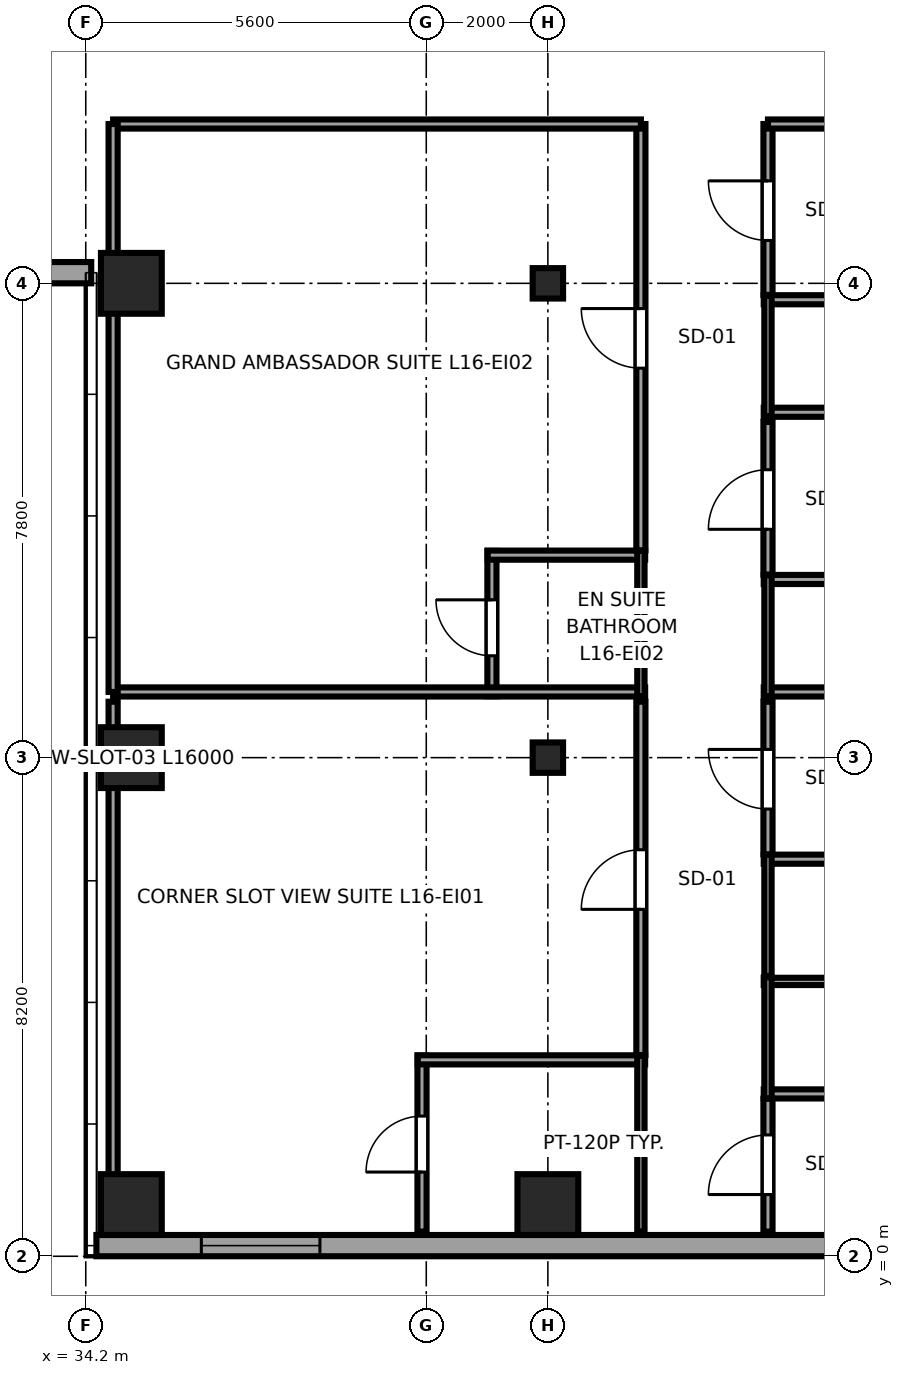
"""IFC4 building model, lengths in metres.
Left out: names, types, materials, properties, quantities, classifications, styles, units other than length and angle.
Written with IfcOpenShell. Run it as: python <this file> out.ifc"""

import sys

from ifc_helpers import new_model, si_unit, direction, frame, frame_2d, origin, origin_2d, place, context, subcontext, project, spatial, rectangle, i_section, extrude, source, transform, mapped, element, fill, save


model = new_model("IFC4")
c1 = context("Model", 3, precision=1e-05, world=origin(), true_north=direction((0.0, 1.0)))
c2 = subcontext(c1, "Body", "Model", "MODEL_VIEW")
j1 = project(units=[si_unit("LENGTHUNIT", "METRE"), si_unit("PLANEANGLEUNIT", "RADIAN")], contexts=[c1])
p1 = place(None, origin())
s1 = spatial("IfcSite", under=j1, at=p1, CompositionType="ELEMENT")
p2 = place(p1, origin())
s2 = spatial("IfcBuilding", under=s1, at=p2, CompositionType="ELEMENT")
p3 = place(p2, frame((0.0, 0.0, 67.5)))
s3 = spatial("IfcBuildingStorey", under=s2, at=p3, CompositionType="ELEMENT", Elevation=67.5)
m1 = source(origin(), c2, "Body", "SweptSolid", [
    extrude(rectangle(XDim=1.0, YDim=1.0, at=origin_2d()), origin(), (0.0, 0.0, 1.0), 3.55),
])
for number, where, z_axis, x_axis in (
    (1, (34.95, 0.85, 0.0), (0.0, 0.0, 1.0), (1.0, 0.0, 0.0)),
    (2, (34.95, 8.2, 0.0), (0.0, 0.0, 1.0), (1.0, 0.0, 0.0)),
    (3, (34.95, 16.0, 0.0), (0.0, 0.0, 1.0), (1.0, 0.0, 0.0)),
    (4, (41.8, 0.85, 0.0), (0.0, 0.0, 1.0), (1.0, 0.0, 0.0)),
):
    element("IfcColumn", number, at=place(p3, frame(where, z_axis=z_axis, x_axis=x_axis)), inside=s3, PredefinedType="COLUMN", context=c2, shape_type="MappedRepresentation", body=[
        mapped(m1, transform((0.0, 0.0, 0.0), x_axis=(1.0, 0.0, 0.0), y_axis=(0.0, 1.0, 0.0), z_axis=(0.0, 0.0, 1.0), scale=1.0)),
    ])
m2 = source(origin(), c2, "Body", "SweptSolid", [
    extrude(i_section(OverallWidth=0.5, OverallDepth=0.5, WebThickness=0.028, FlangeThickness=0.045, at=origin_2d()), origin(), (0.0, 0.0, 1.0), 3.55),
])
for number, where, z_axis, x_axis in (
    (5, (41.8, 8.2, 0.0), (0.0, 0.0, 1.0), (1.0, 0.0, 0.0)),
    (6, (41.8, 16.0, 0.0), (0.0, 0.0, 1.0), (1.0, 0.0, 0.0)),
):
    element("IfcColumn", number, at=place(p3, frame(where, z_axis=z_axis, x_axis=x_axis)), inside=s3, PredefinedType="COLUMN", context=c2, shape_type="MappedRepresentation", body=[
        mapped(m2, transform((0.0, 0.0, 0.0), x_axis=(1.0, 0.0, 0.0), y_axis=(0.0, 1.0, 0.0), z_axis=(0.0, 0.0, 1.0), scale=1.0)),
    ])
p4 = place(p3, frame((22.71, 16.175, 0.0), z_axis=(0.0, 0.0, 1.0), x_axis=(1.0, 0.0, 0.0)))
e7 = element("IfcWall", 7, at=p4, inside=s3, PredefinedType="SOLIDWALL", context=c2, shape_type="SweptSolid", body=[
    extrude(rectangle(XDim=11.58, YDim=0.35, at=frame_2d((5.79, 0.0))), origin(), (0.0, 0.0, 1.0), 2.748),
])
p5 = place(p4, frame((2.22, 0.0, 0.68)))
e8 = element("IfcOpeningElement", 8, at=p5, cuts=e7, PredefinedType="OPENING", context=c2, shape_type="SweptSolid", body=[
    extrude(rectangle(XDim=1.95, YDim=1.82, at=frame_2d((0.975, 0.91))), frame((0.0, 0.185, 0.0), z_axis=(0.0, -1.0, 0.0), x_axis=(1.0, 0.0, 0.0)), (0.0, 0.0, 1.0), 0.37),
])
p6 = place(p4, frame((7.41, 0.0, 0.68)))
e9 = element("IfcOpeningElement", 9, at=p6, cuts=e7, PredefinedType="OPENING", context=c2, shape_type="SweptSolid", body=[
    extrude(rectangle(XDim=1.95, YDim=1.82, at=frame_2d((0.975, 0.91))), frame((0.0, 0.185, 0.0), z_axis=(0.0, -1.0, 0.0), x_axis=(1.0, 0.0, 0.0)), (0.0, 0.0, 1.0), 0.37),
])
p7 = place(p3, frame((34.375, 0.175, 0.0), z_axis=(0.0, 0.0, 1.0), x_axis=(1.0, 0.0, 0.0)))
e10 = element("IfcWall", 10, at=p7, inside=s3, PredefinedType="SOLIDWALL", context=c2, shape_type="SweptSolid", body=[
    extrude(rectangle(XDim=18.008, YDim=0.35, at=frame_2d((9.004, 0.0))), origin(), (0.0, 0.0, 1.0), 3.37),
])
p8 = place(p7, frame((1.726, 0.0, 0.68)))
e11 = element("IfcOpeningElement", 11, at=p8, cuts=e10, PredefinedType="OPENING", context=c2, shape_type="SweptSolid", body=[
    extrude(rectangle(XDim=1.95, YDim=1.82, at=frame_2d((0.975, 0.91))), frame((0.0, 0.185, 0.0), z_axis=(0.0, -1.0, 0.0), x_axis=(1.0, 0.0, 0.0)), (0.0, 0.0, 1.0), 0.37),
])
p9 = place(p7, frame((12.825, 0.0, 0.62)))
e12 = element("IfcOpeningElement", 12, at=p9, cuts=e10, PredefinedType="OPENING", context=c2, shape_type="SweptSolid", body=[
    extrude(rectangle(XDim=1.5, YDim=1.55, at=frame_2d((0.75, 0.775))), frame((0.0, 0.185, 0.0), z_axis=(0.0, -1.0, 0.0), x_axis=(1.0, 0.0, 0.0)), (0.0, 0.0, 1.0), 0.37),
])
p10 = place(p3, frame((39.73, 0.405, 0.0), z_axis=(0.0, 0.0, 1.0), x_axis=(0.0, 1.0, 0.0)))
e13 = element("IfcWall", 13, at=p10, inside=s3, PredefinedType="PARTITIONING", context=c2, shape_type="SweptSolid", body=[
    extrude(rectangle(XDim=2.895, YDim=0.15, at=frame_2d((1.448, 0.0))), origin(), (0.0, 0.0, 1.0), 3.37),
])
p11 = place(p10, frame((0.98, 0.0, 0.0)))
e14 = element("IfcOpeningElement", 14, at=p11, cuts=e13, PredefinedType="OPENING", context=c2, shape_type="SweptSolid", body=[
    extrude(rectangle(XDim=0.92, YDim=2.01, at=frame_2d((0.46, 1.005))), frame((0.0, 0.085, 0.0), z_axis=(0.0, -1.0, 0.0), x_axis=(1.0, 0.0, 0.0)), (0.0, 0.0, 1.0), 0.17),
])
p12 = place(p3, frame((39.66, 3.23, 0.0), z_axis=(0.0, 0.0, 1.0), x_axis=(1.0, 0.0, 0.0)))
e15 = element("IfcWall", 15, at=p12, inside=s3, PredefinedType="PARTITIONING", context=c2, shape_type="SweptSolid", body=[
    extrude(rectangle(XDim=3.74, YDim=0.15, at=frame_2d((1.87, 0.0))), origin(), (0.0, 0.0, 1.0), 3.37),
])
p13 = place(p3, frame((43.33, 0.405, 0.0), z_axis=(0.0, 0.0, 1.0), x_axis=(0.0, 1.0, 0.0)))
e16 = element("IfcWall", 16, at=p13, inside=s3, PredefinedType="PLUMBINGWALL", context=c2, shape_type="SweptSolid", body=[
    extrude(rectangle(XDim=2.895, YDim=0.12, at=frame_2d((1.448, 0.0))), origin(), (0.0, 0.0, 1.0), 3.37),
])
p14 = place(p3, frame((40.88, 9.21, 0.0), z_axis=(0.0, 0.0, 1.0), x_axis=(0.0, 1.0, 0.0)))
e17 = element("IfcWall", 17, at=p14, inside=s3, PredefinedType="PARTITIONING", context=c2, shape_type="SweptSolid", body=[
    extrude(rectangle(XDim=2.39, YDim=0.15, at=frame_2d((1.195, 0.0))), origin(), (0.0, 0.0, 1.0), 3.37),
])
p15 = place(p14, frame((0.665, 0.0, 0.0)))
e18 = element("IfcOpeningElement", 18, at=p15, cuts=e17, PredefinedType="OPENING", context=c2, shape_type="SweptSolid", body=[
    extrude(rectangle(XDim=0.92, YDim=2.01, at=frame_2d((0.46, 1.005))), frame((0.0, 0.085, 0.0), z_axis=(0.0, -1.0, 0.0), x_axis=(1.0, 0.0, 0.0)), (0.0, 0.0, 1.0), 0.17),
])
p16 = place(p3, frame((34.65, 9.28, 0.0), z_axis=(0.0, 0.0, 1.0), x_axis=(1.0, 0.0, 0.0)))
e19 = element("IfcWall", 19, at=p16, inside=s3, PredefinedType="PARTITIONING", context=c2, shape_type="SweptSolid", body=[
    extrude(rectangle(XDim=8.75, YDim=0.15, at=frame_2d((4.375, 0.0))), origin(), (0.0, 0.0, 1.0), 3.37),
])
p17 = place(p3, frame((40.81, 11.53, 0.0), z_axis=(0.0, 0.0, 1.0), x_axis=(1.0, 0.0, 0.0)))
e20 = element("IfcWall", 20, at=p17, inside=s3, PredefinedType="PARTITIONING", context=c2, shape_type="SweptSolid", body=[
    extrude(rectangle(XDim=2.59, YDim=0.15, at=frame_2d((1.295, 0.0))), origin(), (0.0, 0.0, 1.0), 3.37),
])
p18 = place(p3, frame((43.33, 9.21, 0.0), z_axis=(0.0, 0.0, 1.0), x_axis=(0.0, 1.0, 0.0)))
e21 = element("IfcWall", 21, at=p18, inside=s3, PredefinedType="PLUMBINGWALL", context=c2, shape_type="SweptSolid", body=[
    extrude(rectangle(XDim=2.39, YDim=0.12, at=frame_2d((1.195, 0.0))), origin(), (0.0, 0.0, 1.0), 3.37),
])
p19 = place(p3, frame((45.35, 2.67, 0.0), z_axis=(0.0, 0.0, 1.0), x_axis=(1.0, 0.0, 0.0)))
e22 = element("IfcWall", 22, at=p19, inside=s3, PredefinedType="PARTITIONING", context=c2, shape_type="SweptSolid", body=[
    extrude(rectangle(XDim=2.59, YDim=0.15, at=frame_2d((1.295, 0.0))), origin(), (0.0, 0.0, 1.0), 3.37),
])
p20 = place(p3, frame((45.35, 4.52, 0.0), z_axis=(0.0, 0.0, 1.0), x_axis=(1.0, 0.0, 0.0)))
e23 = element("IfcWall", 23, at=p20, inside=s3, PredefinedType="PLUMBINGWALL", context=c2, shape_type="SweptSolid", body=[
    extrude(rectangle(XDim=2.59, YDim=0.12, at=frame_2d((1.295, 0.0))), origin(), (0.0, 0.0, 1.0), 3.37),
])
p21 = place(p3, frame((45.42, 2.6, 0.0), z_axis=(0.0, 0.0, 1.0), x_axis=(0.0, 1.0, 0.0)))
e24 = element("IfcWall", 24, at=p21, inside=s3, PredefinedType="PLUMBINGWALL", context=c2, shape_type="SweptSolid", body=[
    extrude(rectangle(XDim=1.99, YDim=0.12, at=frame_2d((0.995, 0.0))), origin(), (0.0, 0.0, 1.0), 3.37),
])
p22 = place(p3, frame((45.35, 6.53, 0.0), z_axis=(0.0, 0.0, 1.0), x_axis=(1.0, 0.0, 0.0)))
e25 = element("IfcWall", 25, at=p22, inside=s3, PredefinedType="PARTITIONING", context=c2, shape_type="SweptSolid", body=[
    extrude(rectangle(XDim=2.59, YDim=0.15, at=frame_2d((1.295, 0.0))), origin(), (0.0, 0.0, 1.0), 3.37),
])
p23 = place(p3, frame((45.42, 4.61, 0.0), z_axis=(0.0, 0.0, 1.0), x_axis=(0.0, 1.0, 0.0)))
e26 = element("IfcWall", 26, at=p23, inside=s3, PredefinedType="PLUMBINGWALL", context=c2, shape_type="SweptSolid", body=[
    extrude(rectangle(XDim=1.99, YDim=0.12, at=frame_2d((0.995, 0.0))), origin(), (0.0, 0.0, 1.0), 3.37),
])
p24 = place(p3, frame((45.35, 9.28, 0.0), z_axis=(0.0, 0.0, 1.0), x_axis=(1.0, 0.0, 0.0)))
e27 = element("IfcWall", 27, at=p24, inside=s3, PredefinedType="PARTITIONING", context=c2, shape_type="SweptSolid", body=[
    extrude(rectangle(XDim=11.245, YDim=0.15, at=frame_2d((5.623, 0.0))), origin(), (0.0, 0.0, 1.0), 3.37),
])
p25 = place(p3, frame((45.35, 11.13, 0.0), z_axis=(0.0, 0.0, 1.0), x_axis=(1.0, 0.0, 0.0)))
e28 = element("IfcWall", 28, at=p25, inside=s3, PredefinedType="PARTITIONING", context=c2, shape_type="SweptSolid", body=[
    extrude(rectangle(XDim=2.59, YDim=0.15, at=frame_2d((1.295, 0.0))), origin(), (0.0, 0.0, 1.0), 3.37),
])
p26 = place(p3, frame((45.42, 9.21, 0.0), z_axis=(0.0, 0.0, 1.0), x_axis=(0.0, 1.0, 0.0)))
e29 = element("IfcWall", 29, at=p26, inside=s3, PredefinedType="PLUMBINGWALL", context=c2, shape_type="SweptSolid", body=[
    extrude(rectangle(XDim=1.99, YDim=0.12, at=frame_2d((0.995, 0.0))), origin(), (0.0, 0.0, 1.0), 3.37),
])
p27 = place(p3, frame((45.35, 13.88, 0.0), z_axis=(0.0, 0.0, 1.0), x_axis=(1.0, 0.0, 0.0)))
e30 = element("IfcWall", 30, at=p27, inside=s3, PredefinedType="PARTITIONING", context=c2, shape_type="SweptSolid", body=[
    extrude(rectangle(XDim=11.245, YDim=0.15, at=frame_2d((5.623, 0.0))), origin(), (0.0, 0.0, 1.0), 3.37),
])
p28 = place(p3, frame((45.35, 15.73, 0.0), z_axis=(0.0, 0.0, 1.0), x_axis=(1.0, 0.0, 0.0)))
e31 = element("IfcWall", 31, at=p28, inside=s3, PredefinedType="PARTITIONING", context=c2, shape_type="SweptSolid", body=[
    extrude(rectangle(XDim=2.59, YDim=0.15, at=frame_2d((1.295, 0.0))), origin(), (0.0, 0.0, 1.0), 3.37),
])
p29 = place(p3, frame((45.42, 13.81, 0.0), z_axis=(0.0, 0.0, 1.0), x_axis=(0.0, 1.0, 0.0)))
e32 = element("IfcWall", 32, at=p29, inside=s3, PredefinedType="PLUMBINGWALL", context=c2, shape_type="SweptSolid", body=[
    extrude(rectangle(XDim=1.99, YDim=0.12, at=frame_2d((0.995, 0.0))), origin(), (0.0, 0.0, 1.0), 3.37),
])
p30 = place(p3, frame((43.33, 3.31, 0.0), z_axis=(0.0, 0.0, 1.0), x_axis=(0.0, 1.0, 0.0)))
e33 = element("IfcWall", 33, at=p30, inside=s3, PredefinedType="PARTITIONING", context=c2, shape_type="SweptSolid", body=[
    extrude(rectangle(XDim=5.81, YDim=0.15, at=frame_2d((2.905, 0.0))), origin(), (0.0, 0.0, 1.0), 3.37),
])
p31 = place(p30, frame((2.395, 0.0, 0.0)))
e34 = element("IfcOpeningElement", 34, at=p31, cuts=e33, PredefinedType="OPENING", context=c2, shape_type="SweptSolid", body=[
    extrude(rectangle(XDim=0.98, YDim=2.12, at=frame_2d((0.49, 1.06))), frame((0.0, 0.085, 0.0), z_axis=(0.0, -1.0, 0.0), x_axis=(1.0, 0.0, 0.0)), (0.0, 0.0, 1.0), 0.17),
])
p32 = place(p3, frame((34.65, 0.405, 0.0), z_axis=(0.0, 0.0, 1.0), x_axis=(0.0, 1.0, 0.0)))
e35 = element("IfcWall", 35, at=p32, inside=s3, PredefinedType="PARTITIONING", context=c2, shape_type="SweptSolid", body=[
    extrude(rectangle(XDim=8.715, YDim=0.15, at=frame_2d((4.357, 0.0))), origin(), (0.0, 0.0, 1.0), 3.37),
])
p33 = place(p3, frame((43.33, 11.61, 0.0), z_axis=(0.0, 0.0, 1.0), x_axis=(0.0, 1.0, 0.0)))
e36 = element("IfcWall", 36, at=p33, inside=s3, PredefinedType="PARTITIONING", context=c2, shape_type="SweptSolid", body=[
    extrude(rectangle(XDim=7.01, YDim=0.15, at=frame_2d((3.505, 0.0))), origin(), (0.0, 0.0, 1.0), 3.37),
])
p34 = place(p33, frame((2.995, 0.0, 0.0)))
e37 = element("IfcOpeningElement", 37, at=p34, cuts=e36, PredefinedType="OPENING", context=c2, shape_type="SweptSolid", body=[
    extrude(rectangle(XDim=0.98, YDim=2.12, at=frame_2d((0.49, 1.06))), frame((0.0, 0.085, 0.0), z_axis=(0.0, -1.0, 0.0), x_axis=(1.0, 0.0, 0.0)), (0.0, 0.0, 1.0), 0.17),
])
p35 = place(p3, frame((34.65, 18.62, 0.0), z_axis=(0.0, 0.0, 1.0), x_axis=(1.0, 0.0, 0.0)))
e38 = element("IfcWall", 38, at=p35, inside=s3, PredefinedType="PARTITIONING", context=c2, shape_type="SweptSolid", body=[
    extrude(rectangle(XDim=8.68, YDim=0.15, at=frame_2d((4.34, 0.0))), origin(), (0.0, 0.0, 1.0), 3.37),
])
p36 = place(p3, frame((34.65, 9.28, 0.0), z_axis=(0.0, 0.0, 1.0), x_axis=(0.0, 1.0, 0.0)))
e39 = element("IfcWall", 39, at=p36, inside=s3, PredefinedType="PARTITIONING", context=c2, shape_type="SweptSolid", body=[
    extrude(rectangle(XDim=9.34, YDim=0.15, at=frame_2d((4.67, 0.0))), origin(), (0.0, 0.0, 1.0), 3.37),
])
p37 = place(p3, frame((45.42, 0.405, 0.0), z_axis=(0.0, 0.0, 1.0), x_axis=(0.0, 1.0, 0.0)))
e40 = element("IfcWall", 40, at=p37, inside=s3, PredefinedType="PARTITIONING", context=c2, shape_type="SweptSolid", body=[
    extrude(rectangle(XDim=2.185, YDim=0.15, at=frame_2d((1.093, 0.0))), origin(), (0.0, 0.0, 1.0), 3.37),
])
p38 = place(p37, frame((0.61, 0.0, 0.0)))
e41 = element("IfcOpeningElement", 41, at=p38, cuts=e40, PredefinedType="OPENING", context=c2, shape_type="SweptSolid", body=[
    extrude(rectangle(XDim=0.98, YDim=2.12, at=frame_2d((0.49, 1.06))), frame((0.0, 0.085, 0.0), z_axis=(0.0, -1.0, 0.0), x_axis=(1.0, 0.0, 0.0)), (0.0, 0.0, 1.0), 0.17),
])
p39 = place(p3, frame((45.42, 6.61, 0.0), z_axis=(0.0, 0.0, 1.0), x_axis=(0.0, 1.0, 0.0)))
e42 = element("IfcWall", 42, at=p39, inside=s3, PredefinedType="PARTITIONING", context=c2, shape_type="SweptSolid", body=[
    extrude(rectangle(XDim=2.51, YDim=0.15, at=frame_2d((1.255, 0.0))), origin(), (0.0, 0.0, 1.0), 3.37),
])
p40 = place(p39, frame((0.745, 0.0, 0.0)))
e43 = element("IfcOpeningElement", 43, at=p40, cuts=e42, PredefinedType="OPENING", context=c2, shape_type="SweptSolid", body=[
    extrude(rectangle(XDim=0.98, YDim=2.12, at=frame_2d((0.49, 1.06))), frame((0.0, 0.085, 0.0), z_axis=(0.0, -1.0, 0.0), x_axis=(1.0, 0.0, 0.0)), (0.0, 0.0, 1.0), 0.17),
])
p41 = place(p3, frame((45.42, 11.21, 0.0), z_axis=(0.0, 0.0, 1.0), x_axis=(0.0, 1.0, 0.0)))
e44 = element("IfcWall", 44, at=p41, inside=s3, PredefinedType="PARTITIONING", context=c2, shape_type="SweptSolid", body=[
    extrude(rectangle(XDim=2.51, YDim=0.15, at=frame_2d((1.255, 0.0))), origin(), (0.0, 0.0, 1.0), 3.37),
])
p42 = place(p41, frame((0.745, 0.0, 0.0)))
e45 = element("IfcOpeningElement", 45, at=p42, cuts=e44, PredefinedType="OPENING", context=c2, shape_type="SweptSolid", body=[
    extrude(rectangle(XDim=0.98, YDim=2.12, at=frame_2d((0.49, 1.06))), frame((0.0, 0.085, 0.0), z_axis=(0.0, -1.0, 0.0), x_axis=(1.0, 0.0, 0.0)), (0.0, 0.0, 1.0), 0.17),
])
p43 = place(p3, frame((45.42, 15.81, 0.0), z_axis=(0.0, 0.0, 1.0), x_axis=(0.0, 1.0, 0.0)))
e46 = element("IfcWall", 46, at=p43, inside=s3, PredefinedType="PARTITIONING", context=c2, shape_type="SweptSolid", body=[
    extrude(rectangle(XDim=2.81, YDim=0.15, at=frame_2d((1.405, 0.0))), origin(), (0.0, 0.0, 1.0), 3.37),
])
p44 = place(p43, frame((0.895, 0.0, 0.0)))
e47 = element("IfcOpeningElement", 47, at=p44, cuts=e46, PredefinedType="OPENING", context=c2, shape_type="SweptSolid", body=[
    extrude(rectangle(XDim=0.98, YDim=2.12, at=frame_2d((0.49, 1.06))), frame((0.0, 0.085, 0.0), z_axis=(0.0, -1.0, 0.0), x_axis=(1.0, 0.0, 0.0)), (0.0, 0.0, 1.0), 0.17),
])
p45 = place(p3, frame((45.42, 18.62, 0.0), z_axis=(0.0, 0.0, 1.0), x_axis=(1.0, 0.0, 0.0)))
e48 = element("IfcWall", 48, at=p45, inside=s3, PredefinedType="PARTITIONING", context=c2, shape_type="SweptSolid", body=[
    extrude(rectangle(XDim=11.175, YDim=0.15, at=frame_2d((5.587, 0.0))), origin(), (0.0, 0.0, 1.0), 3.37),
])
m3 = source(origin(), c2, "Body", "SweptSolid", [
    extrude(rectangle(XDim=1.95, YDim=1.82, at=frame_2d((0.975, 0.91))), frame((0.0, 0.09, 0.0), z_axis=(0.0, -1.0, 0.0), x_axis=(1.0, 0.0, 0.0)), (0.0, 0.0, 1.0), 0.06),
])
p46 = place(p8, origin())
e49 = element("IfcWindow", 49, at=p46, inside=s3, PartitioningType="DOUBLE_PANEL_VERTICAL", PredefinedType="WINDOW", context=c2, shape_type="MappedRepresentation", body=[
    mapped(m3, transform((0.0, 0.0, 0.0), x_axis=(1.0, 0.0, 0.0), y_axis=(0.0, 1.0, 0.0), z_axis=(0.0, 0.0, 1.0), scale=1.0)),
])
fill(e11, e49)
m4 = source(origin(), c2, "Body", "SweptSolid", [
    extrude(rectangle(XDim=0.92, YDim=2.01, at=frame_2d((0.46, 1.005))), frame((0.0, 0.025, 0.0), z_axis=(0.0, -1.0, 0.0), x_axis=(1.0, 0.0, 0.0)), (0.0, 0.0, 1.0), 0.05),
])
p47 = place(p11, origin())
e50 = element("IfcDoor", 50, at=p47, inside=s3, OperationType="SINGLE_SWING_LEFT", PredefinedType="DOOR", context=c2, shape_type="MappedRepresentation", body=[
    mapped(m4, transform((0.0, 0.0, 0.0), x_axis=(1.0, 0.0, 0.0), y_axis=(0.0, 1.0, 0.0), z_axis=(0.0, 0.0, 1.0), scale=1.0)),
])
fill(e14, e50)
p48 = place(p15, origin())
e51 = element("IfcDoor", 51, at=p48, inside=s3, OperationType="SINGLE_SWING_RIGHT", PredefinedType="DOOR", context=c2, shape_type="MappedRepresentation", body=[
    mapped(m4, transform((0.0, 0.0, 0.0), x_axis=(1.0, 0.0, 0.0), y_axis=(0.0, 1.0, 0.0), z_axis=(0.0, 0.0, 1.0), scale=1.0)),
])
fill(e18, e51)
m5 = source(origin(), c2, "Body", "SweptSolid", [
    extrude(rectangle(XDim=0.98, YDim=2.12, at=frame_2d((0.49, 1.06))), frame((0.0, 0.025, 0.0), z_axis=(0.0, -1.0, 0.0), x_axis=(1.0, 0.0, 0.0)), (0.0, 0.0, 1.0), 0.05),
])
p49 = place(p31, origin())
e52 = element("IfcDoor", 52, at=p49, inside=s3, OperationType="SINGLE_SWING_LEFT", PredefinedType="DOOR", context=c2, shape_type="MappedRepresentation", body=[
    mapped(m5, transform((0.0, 0.0, 0.0), x_axis=(1.0, 0.0, 0.0), y_axis=(0.0, 1.0, 0.0), z_axis=(0.0, 0.0, 1.0), scale=1.0)),
])
fill(e34, e52)
p50 = place(p34, origin())
e53 = element("IfcDoor", 53, at=p50, inside=s3, OperationType="SINGLE_SWING_RIGHT", PredefinedType="DOOR", context=c2, shape_type="MappedRepresentation", body=[
    mapped(m5, transform((0.0, 0.0, 0.0), x_axis=(1.0, 0.0, 0.0), y_axis=(0.0, 1.0, 0.0), z_axis=(0.0, 0.0, 1.0), scale=1.0)),
])
fill(e37, e53)
p51 = place(p38, origin())
e54 = element("IfcDoor", 54, at=p51, inside=s3, OperationType="SINGLE_SWING_LEFT", PredefinedType="DOOR", context=c2, shape_type="MappedRepresentation", body=[
    mapped(m5, transform((0.0, 0.0, 0.0), x_axis=(1.0, 0.0, 0.0), y_axis=(0.0, 1.0, 0.0), z_axis=(0.0, 0.0, 1.0), scale=1.0)),
])
fill(e41, e54)
p52 = place(p40, origin())
e55 = element("IfcDoor", 55, at=p52, inside=s3, OperationType="SINGLE_SWING_RIGHT", PredefinedType="DOOR", context=c2, shape_type="MappedRepresentation", body=[
    mapped(m5, transform((0.0, 0.0, 0.0), x_axis=(1.0, 0.0, 0.0), y_axis=(0.0, 1.0, 0.0), z_axis=(0.0, 0.0, 1.0), scale=1.0)),
])
fill(e43, e55)
p53 = place(p42, origin())
e56 = element("IfcDoor", 56, at=p53, inside=s3, OperationType="SINGLE_SWING_LEFT", PredefinedType="DOOR", context=c2, shape_type="MappedRepresentation", body=[
    mapped(m5, transform((0.0, 0.0, 0.0), x_axis=(1.0, 0.0, 0.0), y_axis=(0.0, 1.0, 0.0), z_axis=(0.0, 0.0, 1.0), scale=1.0)),
])
fill(e45, e56)
p54 = place(p44, origin())
e57 = element("IfcDoor", 57, at=p54, inside=s3, OperationType="SINGLE_SWING_RIGHT", PredefinedType="DOOR", context=c2, shape_type="MappedRepresentation", body=[
    mapped(m5, transform((0.0, 0.0, 0.0), x_axis=(1.0, 0.0, 0.0), y_axis=(0.0, 1.0, 0.0), z_axis=(0.0, 0.0, 1.0), scale=1.0)),
])
fill(e47, e57)
save(model, sys.argv[1])
